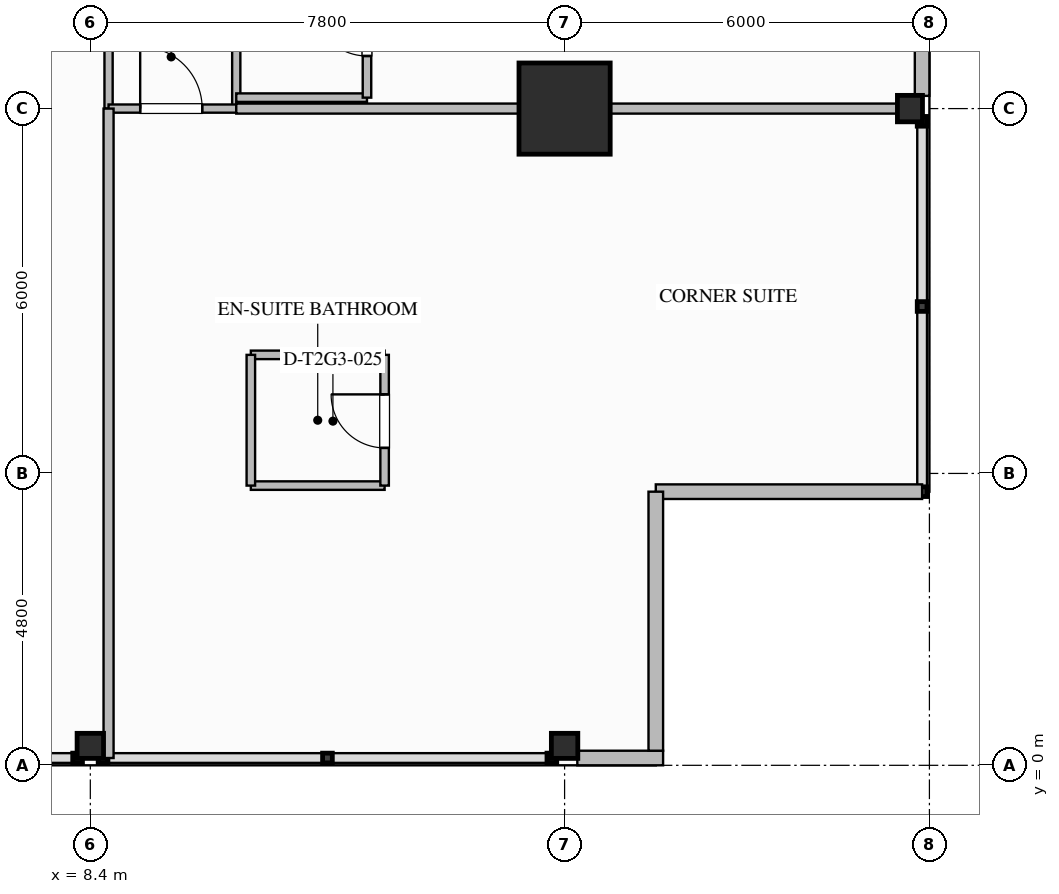
"""IFC4 building model, lengths in metres.
Left out: names, types, materials, properties, quantities, classifications, styles, units other than length and angle.
Written with IfcOpenShell. Run it as: python <this file> out.ifc"""

import sys

from ifc_helpers import new_model, si_unit, direction, frame, frame_2d, origin, origin_2d, place, context, subcontext, project, spatial, rectangle, i_section, extrude, element, fill, save


model = new_model("IFC4")
c1 = context("Model", 3, precision=1e-05, world=origin(), true_north=direction((0.0, 1.0)))
c2 = subcontext(c1, "Body", "Model", "MODEL_VIEW")
j1 = project(units=[si_unit("LENGTHUNIT", "METRE"), si_unit("PLANEANGLEUNIT", "RADIAN")], contexts=[c1])
p1 = place(None, origin())
s1 = spatial("IfcSite", under=j1, at=p1, CompositionType="ELEMENT")
p2 = place(p1, origin())
s2 = spatial("IfcBuilding", under=s1, at=p2, CompositionType="ELEMENT")
p3 = place(p2, frame((0.0, 0.0, 119.8)))
s3 = spatial("IfcBuildingStorey", under=s2, at=p3, CompositionType="ELEMENT", Elevation=119.8)
p4 = place(p3, frame((16.2, 10.8, 0.0), z_axis=(0.0, 0.0, 1.0), x_axis=(1.0, 0.0, 0.0)))
e1 = element("IfcColumn", 1, at=p4, inside=s3, PredefinedType="COLUMN", context=c2, shape_type="SweptSolid", body=[
    extrude(rectangle(XDim=1.5, YDim=1.5, at=origin_2d()), origin(), (0.0, 0.0, 1.0), 3.5),
])
for number, where, z_axis, x_axis in (
    (2, (21.88, 10.8, 0.0), (0.0, 0.0, 1.0), (1.0, 0.0, 0.0)),
    (3, (8.4, 0.32, 0.0), (0.0, 0.0, 1.0), (0.0, 1.0, 0.0)),
    (4, (16.2, 0.32, 0.0), (0.0, 0.0, 1.0), (0.0, 1.0, 0.0)),
):
    element("IfcColumn", number, at=place(p3, frame(where, z_axis=z_axis, x_axis=x_axis)), inside=s3, PredefinedType="COLUMN", context=c2, shape_type="SweptSolid", body=[
        extrude(i_section(OverallWidth=0.412, OverallDepth=0.435, WebThickness=0.036, FlangeThickness=0.057, FilletRadius=0.028, at=origin_2d()), origin(), (0.0, 0.0, 1.0), 3.497),
    ])
p5 = place(p3, frame((22.08, 18.391, 0.0), z_axis=(0.0, 0.0, 1.0), x_axis=(0.0, -1.0, 0.0)))
e5 = element("IfcWall", 5, at=p5, inside=s3, PredefinedType="STANDARD", context=c2, shape_type="SweptSolid", body=[
    extrude(rectangle(XDim=7.381, YDim=0.24, at=frame_2d((3.69, 0.0))), origin(), (0.0, 0.0, 1.0), 2.629),
])
p6 = place(p5, frame((1.791, 0.0, 0.0)))
e6 = element("IfcOpeningElement", 6, at=p6, cuts=e5, PredefinedType="OPENING", context=c2, shape_type="SweptSolid", body=[
    extrude(rectangle(XDim=1.0, YDim=2.2, at=frame_2d((0.5, 1.1))), frame((0.0, 0.13, 0.0), z_axis=(0.0, -1.0, 0.0), x_axis=(1.0, 0.0, 0.0)), (0.0, 0.0, 1.0), 0.26),
])
p7 = place(p5, frame((4.011, 0.0, 0.75)))
e7 = element("IfcOpeningElement", 7, at=p7, cuts=e5, PredefinedType="OPENING", context=c2, shape_type="SweptSolid", body=[
    extrude(rectangle(XDim=1.8, YDim=1.779, at=frame_2d((0.9, 0.89))), frame((0.0, 0.13, 0.0), z_axis=(0.0, -1.0, 0.0), x_axis=(1.0, 0.0, 0.0)), (0.0, 0.0, 1.0), 0.26),
])
p8 = place(p3, frame((17.82, 0.12, 0.0), z_axis=(0.0, 0.0, 1.0), x_axis=(-1.0, 0.0, 0.0)))
e8 = element("IfcWall", 8, at=p8, inside=s3, PredefinedType="STANDARD", context=c2, shape_type="SweptSolid", body=[
    extrude(rectangle(XDim=1.411, YDim=0.24, at=frame_2d((0.705, 0.0))), origin(), (0.0, 0.0, 1.0), 3.24),
])
p9 = place(p3, frame((22.08, 4.5, 0.0), z_axis=(0.0, 0.0, 1.0), x_axis=(-1.0, 0.0, 0.0)))
e9 = element("IfcWall", 9, at=p9, inside=s3, PredefinedType="STANDARD", context=c2, shape_type="SweptSolid", body=[
    extrude(rectangle(XDim=4.38, YDim=0.24, at=frame_2d((2.19, 0.0))), origin(), (0.0, 0.0, 1.0), 3.24),
])
p10 = place(p3, frame((17.7, 4.5, 0.0), z_axis=(0.0, 0.0, 1.0), x_axis=(0.0, -1.0, 0.0)))
e10 = element("IfcWall", 10, at=p10, inside=s3, PredefinedType="STANDARD", context=c2, shape_type="SweptSolid", body=[
    extrude(rectangle(XDim=4.26, YDim=0.24, at=frame_2d((2.13, 0.0))), origin(), (0.0, 0.0, 1.0), 3.24),
])
p11 = place(p3, frame((8.7, 10.8, 0.0), z_axis=(0.0, 0.0, 1.0), x_axis=(0.0, 1.0, 0.0)))
e11 = element("IfcWall", 11, at=p11, inside=s3, PredefinedType="PARTITIONING", context=c2, shape_type="SweptSolid", body=[
    extrude(rectangle(XDim=5.4, YDim=0.135, at=frame_2d((2.7, 0.0))), origin(), (0.0, 0.0, 1.0), 3.24),
])
p12 = place(p3, frame((10.8, 10.8, 0.0), z_axis=(0.0, 0.0, 1.0), x_axis=(0.0, 1.0, 0.0)))
e12 = element("IfcWall", 12, at=p12, inside=s3, PredefinedType="PARTITIONING", context=c2, shape_type="SweptSolid", body=[
    extrude(rectangle(XDim=32.4, YDim=0.135, at=frame_2d((16.2, 0.0))), origin(), (0.0, 0.0, 1.0), 3.24),
])
p13 = place(p12, frame((5.722, 0.0, 0.0)))
e13 = element("IfcOpeningElement", 13, at=p13, cuts=e12, PredefinedType="OPENING", context=c2, shape_type="SweptSolid", body=[
    extrude(rectangle(XDim=1.26, YDim=2.2, at=frame_2d((0.63, 1.1))), frame((0.0, 0.077, 0.0), z_axis=(0.0, -1.0, 0.0), x_axis=(1.0, 0.0, 0.0)), (0.0, 0.0, 1.0), 0.155),
])
p14 = place(p12, frame((16.085, 0.0, 0.0)))
e14 = element("IfcOpeningElement", 14, at=p14, cuts=e12, PredefinedType="OPENING", context=c2, shape_type="SweptSolid", body=[
    extrude(rectangle(XDim=1.02, YDim=2.15, at=frame_2d((0.51, 1.075))), frame((0.0, 0.077, 0.0), z_axis=(0.0, -1.0, 0.0), x_axis=(1.0, 0.0, 0.0)), (0.0, 0.0, 1.0), 0.155),
])
p15 = place(p12, frame((28.244, 0.0, 0.0)))
e15 = element("IfcOpeningElement", 15, at=p15, cuts=e12, PredefinedType="OPENING", context=c2, shape_type="SweptSolid", body=[
    extrude(rectangle(XDim=1.26, YDim=2.2, at=frame_2d((0.63, 1.1))), frame((0.0, 0.077, 0.0), z_axis=(0.0, -1.0, 0.0), x_axis=(1.0, 0.0, 0.0)), (0.0, 0.0, 1.0), 0.155),
])
p16 = place(p3, frame((8.7, 10.8, 0.0), z_axis=(0.0, 0.0, 1.0), x_axis=(1.0, 0.0, 0.0)))
e16 = element("IfcWall", 16, at=p16, inside=s3, PredefinedType="PARTITIONING", context=c2, shape_type="SweptSolid", body=[
    extrude(rectangle(XDim=2.1, YDim=0.135, at=frame_2d((1.05, 0.0))), origin(), (0.0, 0.0, 1.0), 2.53),
])
p17 = place(p16, frame((0.52, 0.0, 0.0)))
e17 = element("IfcOpeningElement", 17, at=p17, cuts=e16, PredefinedType="OPENING", context=c2, shape_type="SweptSolid", body=[
    extrude(rectangle(XDim=1.02, YDim=2.15, at=frame_2d((0.51, 1.075))), frame((0.0, 0.077, 0.0), z_axis=(0.0, -1.0, 0.0), x_axis=(1.0, 0.0, 0.0)), (0.0, 0.0, 1.0), 0.155),
])
p18 = place(p3, frame((8.7, 0.12, 0.0), z_axis=(0.0, 0.0, 1.0), x_axis=(0.0, 1.0, 0.0)))
e18 = element("IfcWall", 18, at=p18, inside=s3, PredefinedType="PARTITIONING", context=c2, shape_type="SweptSolid", body=[
    extrude(rectangle(XDim=10.68, YDim=0.165, at=frame_2d((5.34, 0.0))), origin(), (0.0, 0.0, 1.0), 2.53),
])
p19 = place(p3, frame((10.8, 10.8, 0.0), z_axis=(0.0, 0.0, 1.0), x_axis=(1.0, 0.0, 0.0)))
e19 = element("IfcWall", 19, at=p19, inside=s3, PredefinedType="PARTITIONING", context=c2, shape_type="SweptSolid", body=[
    extrude(rectangle(XDim=11.28, YDim=0.165, at=frame_2d((5.64, 0.0))), origin(), (0.0, 0.0, 1.0), 2.53),
])
for number, where, z_axis, x_axis in (
    (20, (11.04, 4.6, 0.0), (0.0, 0.0, 1.0), (1.0, 0.0, 0.0)),
    (21, (11.04, 6.75, 0.0), (0.0, 0.0, 1.0), (1.0, 0.0, 0.0)),
):
    element("IfcWall", number, at=place(p3, frame(where, z_axis=z_axis, x_axis=x_axis)), inside=s3, PredefinedType="PLUMBINGWALL", context=c2, shape_type="SweptSolid", body=[
        extrude(rectangle(XDim=2.2, YDim=0.14, at=frame_2d((1.1, 0.0))), origin(), (0.0, 0.0, 1.0), 3.24),
    ])
p20 = place(p3, frame((11.04, 4.6, 0.0), z_axis=(0.0, 0.0, 1.0), x_axis=(0.0, 1.0, 0.0)))
e22 = element("IfcWall", 22, at=p20, inside=s3, PredefinedType="PLUMBINGWALL", context=c2, shape_type="SweptSolid", body=[
    extrude(rectangle(XDim=2.15, YDim=0.14, at=frame_2d((1.075, 0.0))), origin(), (0.0, 0.0, 1.0), 3.24),
])
p21 = place(p3, frame((13.24, 4.6, 0.0), z_axis=(0.0, 0.0, 1.0), x_axis=(0.0, 1.0, 0.0)))
e23 = element("IfcWall", 23, at=p21, inside=s3, PredefinedType="PLUMBINGWALL", context=c2, shape_type="SweptSolid", body=[
    extrude(rectangle(XDim=2.15, YDim=0.14, at=frame_2d((1.075, 0.0))), origin(), (0.0, 0.0, 1.0), 3.24),
])
p22 = place(p21, frame((0.62, 0.0, 0.0)))
e24 = element("IfcOpeningElement", 24, at=p22, cuts=e23, PredefinedType="OPENING", context=c2, shape_type="SweptSolid", body=[
    extrude(rectangle(XDim=0.88, YDim=2.1, at=frame_2d((0.44, 1.05))), frame((0.0, 0.08, 0.0), z_axis=(0.0, -1.0, 0.0), x_axis=(1.0, 0.0, 0.0)), (0.0, 0.0, 1.0), 0.16),
])
p23 = place(p3, frame((10.8, 10.98, 0.0), z_axis=(0.0, 0.0, 1.0), x_axis=(1.0, 0.0, 0.0)))
e25 = element("IfcWall", 25, at=p23, inside=s3, PredefinedType="PLUMBINGWALL", context=c2, shape_type="SweptSolid", body=[
    extrude(rectangle(XDim=2.15, YDim=0.14, at=frame_2d((1.075, 0.0))), origin(), (0.0, 0.0, 1.0), 2.53),
])
p24 = place(p3, frame((12.95, 10.98, 0.0), z_axis=(0.0, 0.0, 1.0), x_axis=(0.0, 1.0, 0.0)))
e26 = element("IfcWall", 26, at=p24, inside=s3, PredefinedType="PLUMBINGWALL", context=c2, shape_type="SweptSolid", body=[
    extrude(rectangle(XDim=2.25, YDim=0.14, at=frame_2d((1.125, 0.0))), origin(), (0.0, 0.0, 1.0), 3.24),
])
p25 = place(p24, frame((0.685, 0.0, 0.0)))
e27 = element("IfcOpeningElement", 27, at=p25, cuts=e26, PredefinedType="OPENING", context=c2, shape_type="SweptSolid", body=[
    extrude(rectangle(XDim=0.88, YDim=2.1, at=frame_2d((0.44, 1.05))), frame((0.0, 0.08, 0.0), z_axis=(0.0, -1.0, 0.0), x_axis=(1.0, 0.0, 0.0)), (0.0, 0.0, 1.0), 0.16),
])
p26 = place(p22, origin())
e28 = element("IfcDoor", 28, at=p26, inside=s3, OperationType="SINGLE_SWING_RIGHT", PredefinedType="DOOR", context=c2, shape_type="SweptSolid", body=[
    extrude(rectangle(XDim=0.88, YDim=2.1, at=frame_2d((0.44, 1.05))), frame((0.0, 0.025, 0.0), z_axis=(0.0, -1.0, 0.0), x_axis=(1.0, 0.0, 0.0)), (0.0, 0.0, 1.0), 0.05),
])
fill(e24, e28)
p27 = place(p17, origin())
e29 = element("IfcDoor", 29, at=p27, inside=s3, OperationType="SINGLE_SWING_LEFT", PredefinedType="DOOR", context=c2, shape_type="SweptSolid", body=[
    extrude(rectangle(XDim=1.02, YDim=2.15, at=frame_2d((0.51, 1.075))), frame((0.0, 0.025, 0.0), z_axis=(0.0, -1.0, 0.0), x_axis=(1.0, 0.0, 0.0)), (0.0, 0.0, 1.0), 0.05),
])
fill(e17, e29)
p28 = place(p25, origin())
e30 = element("IfcDoor", 30, at=p28, inside=s3, OperationType="SINGLE_SWING_RIGHT", PredefinedType="DOOR", context=c2, shape_type="SweptSolid", body=[
    extrude(rectangle(XDim=0.88, YDim=2.1, at=frame_2d((0.44, 1.05))), frame((0.0, 0.025, 0.0), z_axis=(0.0, -1.0, 0.0), x_axis=(1.0, 0.0, 0.0)), (0.0, 0.0, 1.0), 0.05),
])
fill(e27, e30)
save(model, sys.argv[1])
